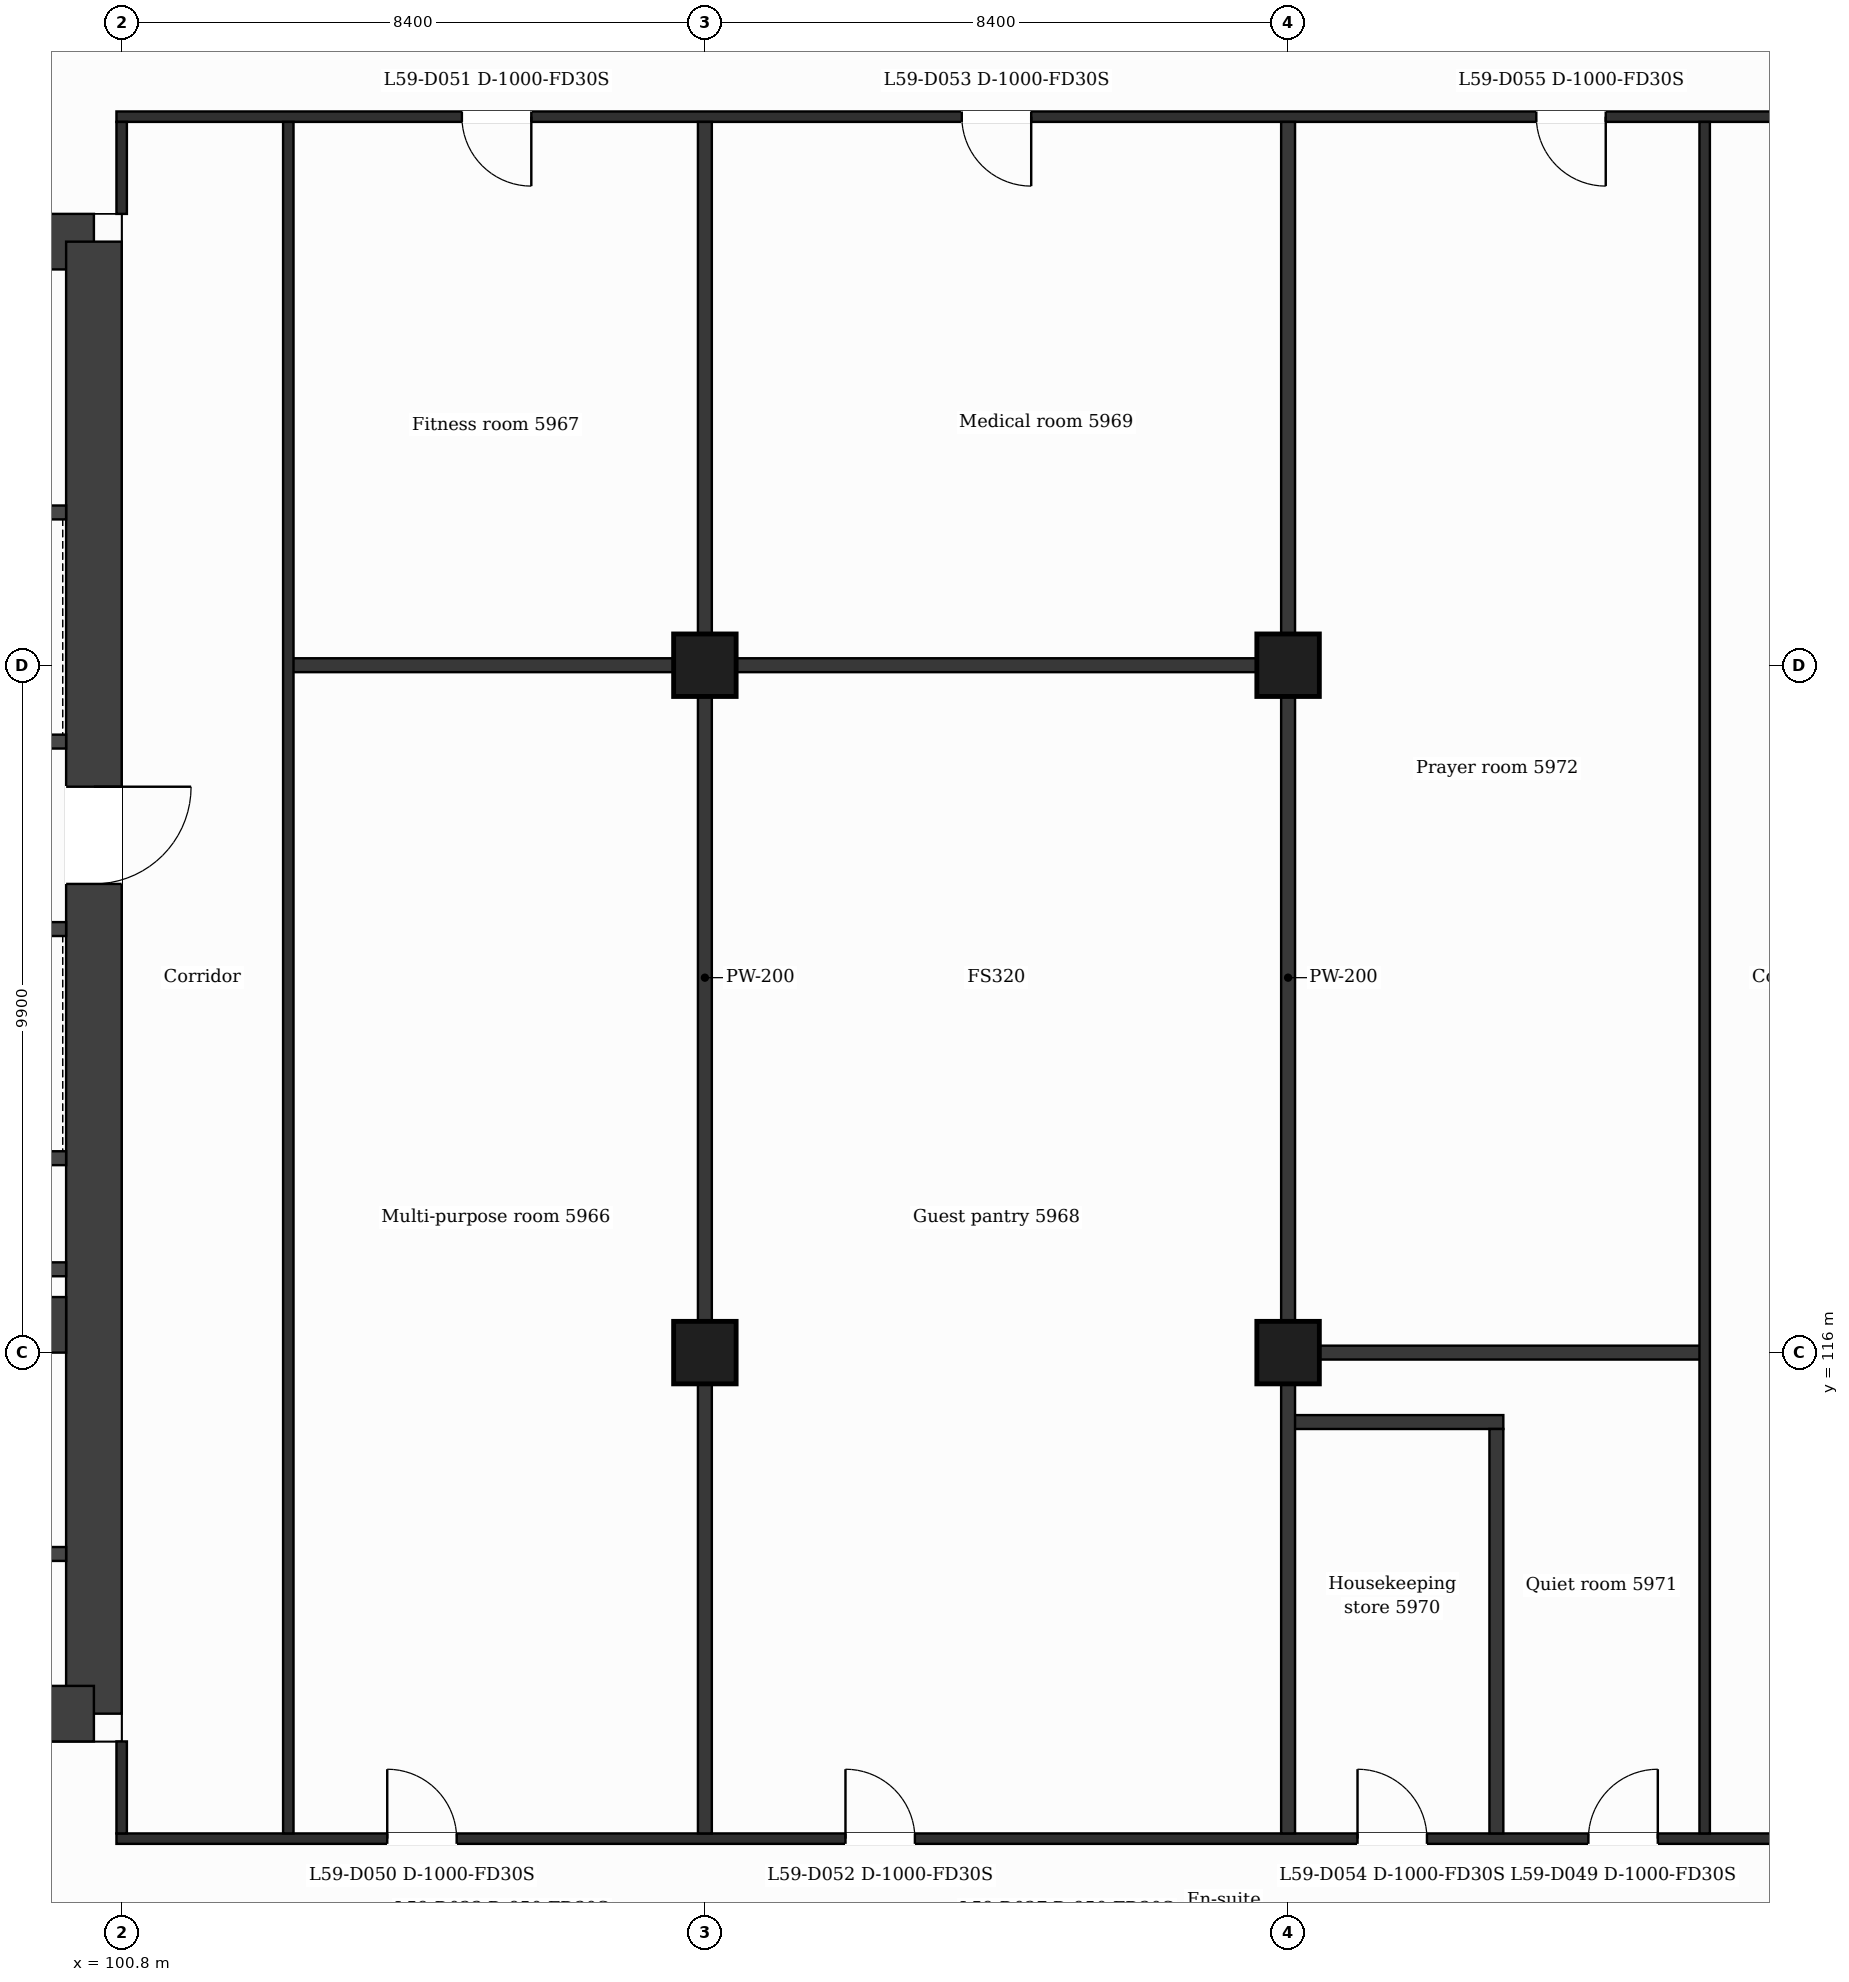
"""IFC4 building model, lengths in metres.
Left out: names, types, materials, properties, quantities, classifications, styles, units other than length and angle.
Written with IfcOpenShell. Run it as: python <this file> out.ifc"""

import sys

from ifc_helpers import new_model, si_unit, direction, frame, frame_2d, origin, origin_2d, place, context, subcontext, project, spatial, rectangle, extrude, element, fill, save


model = new_model("IFC4")
c1 = context("Model", 3, precision=1e-05, world=origin(), true_north=direction((0.0, 1.0)))
c2 = subcontext(c1, "Body", "Model", "MODEL_VIEW")
j1 = project(units=[si_unit("LENGTHUNIT", "METRE"), si_unit("PLANEANGLEUNIT", "RADIAN")], contexts=[c1])
p1 = place(None, origin())
s1 = spatial("IfcSite", under=j1, at=p1, CompositionType="ELEMENT")
p2 = place(p1, origin())
s2 = spatial("IfcBuilding", under=s1, at=p2, CompositionType="ELEMENT")
p3 = place(p2, frame((0.0, 0.0, 242.9)))
s3 = spatial("IfcBuildingStorey", under=s2, at=p3, CompositionType="ELEMENT", Elevation=242.9)
p4 = place(p3, frame((88.98, 132.0, 0.0), z_axis=(0.0, 0.0, 1.0), x_axis=(1.0, 0.0, 0.0)))
e1 = element("IfcWall", 1, at=p4, inside=s3, PredefinedType="SHEAR", context=c2, shape_type="SweptSolid", body=[
    extrude(rectangle(XDim=11.419, YDim=0.8, at=frame_2d((5.71, 0.0))), origin(), (0.0, 0.0, 1.0), 3.7),
])
p5 = place(p4, frame((6.833, 0.0, 0.0)))
e2 = element("IfcOpeningElement", 2, at=p5, cuts=e1, PredefinedType="OPENING", context=c2, shape_type="SweptSolid", body=[
    extrude(rectangle(XDim=1.2, YDim=2.1, at=frame_2d((0.6, 1.05))), frame((0.0, 0.41, 0.0), z_axis=(0.0, -1.0, 0.0), x_axis=(1.0, 0.0, 0.0)), (0.0, 0.0, 1.0), 0.82),
])
p6 = place(p3, frame((100.4, 132.0, 0.0), z_axis=(0.0, 0.0, 1.0), x_axis=(0.0, -1.0, 0.0)))
e3 = element("IfcWall", 3, at=p6, inside=s3, PredefinedType="SHEAR", context=c2, shape_type="SweptSolid", body=[
    extrude(rectangle(XDim=21.2, YDim=0.8, at=frame_2d((10.6, 0.0))), origin(), (0.0, 0.0, 1.0), 3.7),
])
p7 = place(p6, frame((7.85, 0.0, 0.0)))
e4 = element("IfcOpeningElement", 4, at=p7, cuts=e3, PredefinedType="OPENING", context=c2, shape_type="SweptSolid", body=[
    extrude(rectangle(XDim=1.4, YDim=2.1, at=frame_2d((0.7, 1.05))), frame((0.0, 0.41, 0.0), z_axis=(0.0, -1.0, 0.0), x_axis=(1.0, 0.0, 0.0)), (0.0, 0.0, 1.0), 0.82),
])
p8 = place(p3, frame((100.4, 110.8, 0.0), z_axis=(0.0, 0.0, 1.0), x_axis=(-1.0, 0.0, 0.0)))
e5 = element("IfcWall", 5, at=p8, inside=s3, PredefinedType="SHEAR", context=c2, shape_type="SweptSolid", body=[
    extrude(rectangle(XDim=14.273, YDim=0.8, at=frame_2d((7.137, 0.0))), origin(), (0.0, 0.0, 1.0), 3.7),
])
p9 = place(p8, frame((5.908, 0.0, 0.0)))
e6 = element("IfcOpeningElement", 6, at=p9, cuts=e5, PredefinedType="OPENING", context=c2, shape_type="SweptSolid", body=[
    extrude(rectangle(XDim=1.4, YDim=2.1, at=frame_2d((0.7, 1.05))), frame((0.0, 0.41, 0.0), z_axis=(0.0, -1.0, 0.0), x_axis=(1.0, 0.0, 0.0)), (0.0, 0.0, 1.0), 0.82),
])
p10 = place(p3, frame((94.7, 116.4, 0.0), z_axis=(0.0, 0.0, 1.0), x_axis=(1.0, 0.0, 0.0)))
e7 = element("IfcWall", 7, at=p10, inside=s3, PredefinedType="SHEAR", context=c2, shape_type="SweptSolid", body=[
    extrude(rectangle(XDim=5.3, YDim=0.8, at=frame_2d((2.65, 0.0))), origin(), (0.0, 0.0, 1.0), 3.7),
])
for number, where, z_axis, x_axis in (
    (8, (109.2, 116.0, 0.0), (0.0, 0.0, 1.0), (1.0, 0.0, 0.0)),
    (9, (117.6, 116.0, 0.0), (0.0, 0.0, 1.0), (1.0, 0.0, 0.0)),
    (10, (109.2, 125.9, 0.0), (0.0, 0.0, 1.0), (1.0, 0.0, 0.0)),
    (11, (117.6, 125.9, 0.0), (0.0, 0.0, 1.0), (1.0, 0.0, 0.0)),
):
    element("IfcColumn", number, at=place(p3, frame(where, z_axis=z_axis, x_axis=x_axis)), inside=s3, PredefinedType="COLUMN", context=c2, shape_type="SweptSolid", body=[
        extrude(rectangle(XDim=0.9, YDim=0.9, at=origin_2d()), origin(), (0.0, 0.0, 1.0), 3.7),
    ])
p11 = place(p3, frame((100.725, 109.0, 0.0), z_axis=(0.0, 0.0, 1.0), x_axis=(1.0, 0.0, 0.0)))
e12 = element("IfcWall", 12, at=p11, inside=s3, PredefinedType="PARTITIONING", context=c2, shape_type="SweptSolid", body=[
    extrude(rectangle(XDim=25.35, YDim=0.15, at=frame_2d((12.675, 0.0))), origin(), (0.0, 0.0, 1.0), 3.2),
])
p12 = place(p11, frame((21.2, 0.0, 0.0)))
e13 = element("IfcOpeningElement", 13, at=p12, cuts=e12, PredefinedType="OPENING", context=c2, shape_type="SweptSolid", body=[
    extrude(rectangle(XDim=1.0, YDim=2.1, at=frame_2d((0.5, 1.05))), frame((0.0, 0.085, 0.0), z_axis=(0.0, -1.0, 0.0), x_axis=(1.0, 0.0, 0.0)), (0.0, 0.0, 1.0), 0.17),
])
p13 = place(p11, frame((3.9, 0.0, 0.0)))
e14 = element("IfcOpeningElement", 14, at=p13, cuts=e12, PredefinedType="OPENING", context=c2, shape_type="SweptSolid", body=[
    extrude(rectangle(XDim=1.0, YDim=2.1, at=frame_2d((0.5, 1.05))), frame((0.0, 0.085, 0.0), z_axis=(0.0, -1.0, 0.0), x_axis=(1.0, 0.0, 0.0)), (0.0, 0.0, 1.0), 0.17),
])
p14 = place(p11, frame((10.5, 0.0, 0.0)))
e15 = element("IfcOpeningElement", 15, at=p14, cuts=e12, PredefinedType="OPENING", context=c2, shape_type="SweptSolid", body=[
    extrude(rectangle(XDim=1.0, YDim=2.1, at=frame_2d((0.5, 1.05))), frame((0.0, 0.085, 0.0), z_axis=(0.0, -1.0, 0.0), x_axis=(1.0, 0.0, 0.0)), (0.0, 0.0, 1.0), 0.17),
])
p15 = place(p11, frame((17.875, 0.0, 0.0)))
e16 = element("IfcOpeningElement", 16, at=p15, cuts=e12, PredefinedType="OPENING", context=c2, shape_type="SweptSolid", body=[
    extrude(rectangle(XDim=1.0, YDim=2.1, at=frame_2d((0.5, 1.05))), frame((0.0, 0.085, 0.0), z_axis=(0.0, -1.0, 0.0), x_axis=(1.0, 0.0, 0.0)), (0.0, 0.0, 1.0), 0.17),
])
p16 = place(p3, frame((95.127, 113.1, 0.0), z_axis=(0.0, 0.0, 1.0), x_axis=(1.0, 0.0, 0.0)))
e17 = element("IfcWall", 17, at=p16, inside=s3, PredefinedType="PARTITIONING", context=c2, shape_type="SweptSolid", body=[
    extrude(rectangle(XDim=4.873, YDim=0.2, at=frame_2d((2.437, 0.0))), origin(), (0.0, 0.0, 1.0), 3.2),
])
p17 = place(p16, frame((3.426, 0.0, 0.0)))
e18 = element("IfcOpeningElement", 18, at=p17, cuts=e17, PredefinedType="OPENING", context=c2, shape_type="SweptSolid", body=[
    extrude(rectangle(XDim=0.9, YDim=2.1, at=frame_2d((0.45, 1.05))), frame((0.0, 0.11, 0.0), z_axis=(0.0, -1.0, 0.0), x_axis=(1.0, 0.0, 0.0)), (0.0, 0.0, 1.0), 0.22),
])
p18 = place(p3, frame((117.6, 115.0, 0.0), z_axis=(0.0, 0.0, 1.0), x_axis=(1.0, 0.0, 0.0)))
e19 = element("IfcWall", 19, at=p18, inside=s3, PredefinedType="PARTITIONING", context=c2, shape_type="SweptSolid", body=[
    extrude(rectangle(XDim=3.1, YDim=0.2, at=frame_2d((1.55, 0.0))), origin(), (0.0, 0.0, 1.0), 3.2),
])
p19 = place(p3, frame((117.6, 116.0, 0.0), z_axis=(0.0, 0.0, 1.0), x_axis=(1.0, 0.0, 0.0)))
e20 = element("IfcWall", 20, at=p19, inside=s3, PredefinedType="PARTITIONING", context=c2, shape_type="SweptSolid", body=[
    extrude(rectangle(XDim=6.0, YDim=0.2, at=frame_2d((3.0, 0.0))), origin(), (0.0, 0.0, 1.0), 3.2),
])
for number, where, z_axis, x_axis in (
    (21, (95.227, 117.2, 0.0), (0.0, 0.0, 1.0), (1.0, 0.0, 0.0)),
    (22, (95.227, 118.8, 0.0), (0.0, 0.0, 1.0), (1.0, 0.0, 0.0)),
):
    element("IfcWall", number, at=place(p3, frame(where, z_axis=z_axis, x_axis=x_axis)), inside=s3, PredefinedType="PARTITIONING", context=c2, shape_type="SweptSolid", body=[
        extrude(rectangle(XDim=4.773, YDim=0.2, at=frame_2d((2.386, 0.0))), origin(), (0.0, 0.0, 1.0), 3.2),
    ])
p20 = place(p3, frame((95.227, 122.1, 0.0), z_axis=(0.0, 0.0, 1.0), x_axis=(1.0, 0.0, 0.0)))
e23 = element("IfcWall", 23, at=p20, inside=s3, PredefinedType="PARTITIONING", context=c2, shape_type="SweptSolid", body=[
    extrude(rectangle(XDim=4.773, YDim=0.2, at=frame_2d((2.386, 0.0))), origin(), (0.0, 0.0, 1.0), 3.2),
])
p21 = place(p20, frame((0.702, 0.0, 0.0)))
e24 = element("IfcOpeningElement", 24, at=p21, cuts=e23, PredefinedType="OPENING", context=c2, shape_type="SweptSolid", body=[
    extrude(rectangle(XDim=1.1, YDim=2.1, at=frame_2d((0.55, 1.05))), frame((0.0, 0.11, 0.0), z_axis=(0.0, -1.0, 0.0), x_axis=(1.0, 0.0, 0.0)), (0.0, 0.0, 1.0), 0.22),
])
p22 = place(p20, frame((2.971, 0.0, 0.0)))
e25 = element("IfcOpeningElement", 25, at=p22, cuts=e23, PredefinedType="OPENING", context=c2, shape_type="SweptSolid", body=[
    extrude(rectangle(XDim=1.1, YDim=2.1, at=frame_2d((0.55, 1.05))), frame((0.0, 0.11, 0.0), z_axis=(0.0, -1.0, 0.0), x_axis=(1.0, 0.0, 0.0)), (0.0, 0.0, 1.0), 0.22),
])
p23 = place(p3, frame((92.702, 124.8, 0.0), z_axis=(0.0, 0.0, 1.0), x_axis=(1.0, 0.0, 0.0)))
e26 = element("IfcWall", 26, at=p23, inside=s3, PredefinedType="PARTITIONING", context=c2, shape_type="SweptSolid", body=[
    extrude(rectangle(XDim=7.298, YDim=0.2, at=frame_2d((3.649, 0.0))), origin(), (0.0, 0.0, 1.0), 3.2),
])
p24 = place(p23, frame((5.7, 0.0, 0.0)))
e27 = element("IfcOpeningElement", 27, at=p24, cuts=e26, PredefinedType="OPENING", context=c2, shape_type="SweptSolid", body=[
    extrude(rectangle(XDim=1.1, YDim=2.1, at=frame_2d((0.55, 1.05))), frame((0.0, 0.11, 0.0), z_axis=(0.0, -1.0, 0.0), x_axis=(1.0, 0.0, 0.0)), (0.0, 0.0, 1.0), 0.22),
])
p25 = place(p3, frame((103.2, 125.9, 0.0), z_axis=(0.0, 0.0, 1.0), x_axis=(1.0, 0.0, 0.0)))
e28 = element("IfcWall", 28, at=p25, inside=s3, PredefinedType="PARTITIONING", context=c2, shape_type="SweptSolid", body=[
    extrude(rectangle(XDim=14.4, YDim=0.2, at=frame_2d((7.2, 0.0))), origin(), (0.0, 0.0, 1.0), 3.2),
])
p26 = place(p3, frame((92.827, 128.1, 0.0), z_axis=(0.0, 0.0, 1.0), x_axis=(1.0, 0.0, 0.0)))
e29 = element("IfcWall", 29, at=p26, inside=s3, PredefinedType="PARTITIONING", context=c2, shape_type="SweptSolid", body=[
    extrude(rectangle(XDim=7.173, YDim=0.2, at=frame_2d((3.586, 0.0))), origin(), (0.0, 0.0, 1.0), 3.2),
])
p27 = place(p26, frame((2.977, 0.0, 0.0)))
e30 = element("IfcOpeningElement", 30, at=p27, cuts=e29, PredefinedType="OPENING", context=c2, shape_type="SweptSolid", body=[
    extrude(rectangle(XDim=1.1, YDim=2.1, at=frame_2d((0.55, 1.05))), frame((0.0, 0.11, 0.0), z_axis=(0.0, -1.0, 0.0), x_axis=(1.0, 0.0, 0.0)), (0.0, 0.0, 1.0), 0.22),
])
p28 = place(p3, frame((100.725, 133.8, 0.0), z_axis=(0.0, 0.0, 1.0), x_axis=(1.0, 0.0, 0.0)))
e31 = element("IfcWall", 31, at=p28, inside=s3, PredefinedType="PARTITIONING", context=c2, shape_type="SweptSolid", body=[
    extrude(rectangle(XDim=25.35, YDim=0.15, at=frame_2d((12.675, 0.0))), origin(), (0.0, 0.0, 1.0), 3.2),
])
p29 = place(p28, frame((4.975, 0.0, 0.0)))
e32 = element("IfcOpeningElement", 32, at=p29, cuts=e31, PredefinedType="OPENING", context=c2, shape_type="SweptSolid", body=[
    extrude(rectangle(XDim=1.0, YDim=2.1, at=frame_2d((0.5, 1.05))), frame((0.0, 0.085, 0.0), z_axis=(0.0, -1.0, 0.0), x_axis=(1.0, 0.0, 0.0)), (0.0, 0.0, 1.0), 0.17),
])
p30 = place(p28, frame((12.175, 0.0, 0.0)))
e33 = element("IfcOpeningElement", 33, at=p30, cuts=e31, PredefinedType="OPENING", context=c2, shape_type="SweptSolid", body=[
    extrude(rectangle(XDim=1.0, YDim=2.1, at=frame_2d((0.5, 1.05))), frame((0.0, 0.085, 0.0), z_axis=(0.0, -1.0, 0.0), x_axis=(1.0, 0.0, 0.0)), (0.0, 0.0, 1.0), 0.17),
])
p31 = place(p28, frame((20.45, 0.0, 0.0)))
e34 = element("IfcOpeningElement", 34, at=p31, cuts=e31, PredefinedType="OPENING", context=c2, shape_type="SweptSolid", body=[
    extrude(rectangle(XDim=1.0, YDim=2.1, at=frame_2d((0.5, 1.05))), frame((0.0, 0.085, 0.0), z_axis=(0.0, -1.0, 0.0), x_axis=(1.0, 0.0, 0.0)), (0.0, 0.0, 1.0), 0.17),
])
p32 = place(p3, frame((100.8, 109.075, 0.0), z_axis=(0.0, 0.0, 1.0), x_axis=(0.0, 1.0, 0.0)))
e35 = element("IfcWall", 35, at=p32, inside=s3, PredefinedType="PARTITIONING", context=c2, shape_type="SweptSolid", body=[
    extrude(rectangle(XDim=1.325, YDim=0.15, at=frame_2d((0.663, 0.0))), origin(), (0.0, 0.0, 1.0), 3.2),
])
p33 = place(p3, frame((100.8, 132.4, 0.0), z_axis=(0.0, 0.0, 1.0), x_axis=(0.0, 1.0, 0.0)))
e36 = element("IfcWall", 36, at=p33, inside=s3, PredefinedType="PARTITIONING", context=c2, shape_type="SweptSolid", body=[
    extrude(rectangle(XDim=1.325, YDim=0.15, at=frame_2d((0.663, 0.0))), origin(), (0.0, 0.0, 1.0), 3.2),
])
p34 = place(p3, frame((103.2, 109.075, 0.0), z_axis=(0.0, 0.0, 1.0), x_axis=(0.0, 1.0, 0.0)))
e37 = element("IfcWall", 37, at=p34, inside=s3, PredefinedType="PARTITIONING", context=c2, shape_type="SweptSolid", body=[
    extrude(rectangle(XDim=24.65, YDim=0.15, at=frame_2d((12.325, 0.0))), origin(), (0.0, 0.0, 1.0), 3.2),
])
for number, where, z_axis, x_axis in (
    (38, (109.2, 109.075, 0.0), (0.0, 0.0, 1.0), (0.0, 1.0, 0.0)),
    (39, (117.6, 109.075, 0.0), (0.0, 0.0, 1.0), (0.0, 1.0, 0.0)),
):
    element("IfcWall", number, at=place(p3, frame(where, z_axis=z_axis, x_axis=x_axis)), inside=s3, PredefinedType="PARTITIONING", context=c2, shape_type="SweptSolid", body=[
        extrude(rectangle(XDim=24.65, YDim=0.2, at=frame_2d((12.325, 0.0))), origin(), (0.0, 0.0, 1.0), 3.2),
    ])
p35 = place(p3, frame((120.6, 109.075, 0.0), z_axis=(0.0, 0.0, 1.0), x_axis=(0.0, 1.0, 0.0)))
e40 = element("IfcWall", 40, at=p35, inside=s3, PredefinedType="PARTITIONING", context=c2, shape_type="SweptSolid", body=[
    extrude(rectangle(XDim=5.825, YDim=0.2, at=frame_2d((2.913, 0.0))), origin(), (0.0, 0.0, 1.0), 3.2),
])
p36 = place(p3, frame((123.6, 109.075, 0.0), z_axis=(0.0, 0.0, 1.0), x_axis=(0.0, 1.0, 0.0)))
e41 = element("IfcWall", 41, at=p36, inside=s3, PredefinedType="PARTITIONING", context=c2, shape_type="SweptSolid", body=[
    extrude(rectangle(XDim=24.65, YDim=0.15, at=frame_2d((12.325, 0.0))), origin(), (0.0, 0.0, 1.0), 3.2),
])
p37 = place(p12, origin())
e42 = element("IfcDoor", 42, at=p37, inside=s3, OperationType="SINGLE_SWING_RIGHT", PredefinedType="DOOR", context=c2, shape_type="SweptSolid", body=[
    extrude(rectangle(XDim=1.0, YDim=2.1, at=frame_2d((0.5, 1.05))), frame((0.0, 0.025, 0.0), z_axis=(0.0, -1.0, 0.0), x_axis=(1.0, 0.0, 0.0)), (0.0, 0.0, 1.0), 0.05),
])
fill(e13, e42)
p38 = place(p13, origin())
e43 = element("IfcDoor", 43, at=p38, inside=s3, OperationType="SINGLE_SWING_LEFT", PredefinedType="DOOR", context=c2, shape_type="SweptSolid", body=[
    extrude(rectangle(XDim=1.0, YDim=2.1, at=frame_2d((0.5, 1.05))), frame((0.0, 0.025, 0.0), z_axis=(0.0, -1.0, 0.0), x_axis=(1.0, 0.0, 0.0)), (0.0, 0.0, 1.0), 0.05),
])
fill(e14, e43)
p39 = place(p29, origin())
e44 = element("IfcDoor", 44, at=p39, inside=s3, OperationType="SINGLE_SWING_RIGHT", PredefinedType="DOOR", context=c2, shape_type="SweptSolid", body=[
    extrude(rectangle(XDim=1.0, YDim=2.1, at=frame_2d((0.5, 1.05))), frame((0.0, 0.025, 0.0), z_axis=(0.0, -1.0, 0.0), x_axis=(1.0, 0.0, 0.0)), (0.0, 0.0, 1.0), 0.05),
])
fill(e32, e44)
p40 = place(p14, origin())
e45 = element("IfcDoor", 45, at=p40, inside=s3, OperationType="SINGLE_SWING_LEFT", PredefinedType="DOOR", context=c2, shape_type="SweptSolid", body=[
    extrude(rectangle(XDim=1.0, YDim=2.1, at=frame_2d((0.5, 1.05))), frame((0.0, 0.025, 0.0), z_axis=(0.0, -1.0, 0.0), x_axis=(1.0, 0.0, 0.0)), (0.0, 0.0, 1.0), 0.05),
])
fill(e15, e45)
p41 = place(p30, origin())
e46 = element("IfcDoor", 46, at=p41, inside=s3, OperationType="SINGLE_SWING_RIGHT", PredefinedType="DOOR", context=c2, shape_type="SweptSolid", body=[
    extrude(rectangle(XDim=1.0, YDim=2.1, at=frame_2d((0.5, 1.05))), frame((0.0, 0.025, 0.0), z_axis=(0.0, -1.0, 0.0), x_axis=(1.0, 0.0, 0.0)), (0.0, 0.0, 1.0), 0.05),
])
fill(e33, e46)
p42 = place(p15, origin())
e47 = element("IfcDoor", 47, at=p42, inside=s3, OperationType="SINGLE_SWING_LEFT", PredefinedType="DOOR", context=c2, shape_type="SweptSolid", body=[
    extrude(rectangle(XDim=1.0, YDim=2.1, at=frame_2d((0.5, 1.05))), frame((0.0, 0.025, 0.0), z_axis=(0.0, -1.0, 0.0), x_axis=(1.0, 0.0, 0.0)), (0.0, 0.0, 1.0), 0.05),
])
fill(e16, e47)
p43 = place(p31, origin())
e48 = element("IfcDoor", 48, at=p43, inside=s3, OperationType="SINGLE_SWING_RIGHT", PredefinedType="DOOR", context=c2, shape_type="SweptSolid", body=[
    extrude(rectangle(XDim=1.0, YDim=2.1, at=frame_2d((0.5, 1.05))), frame((0.0, 0.025, 0.0), z_axis=(0.0, -1.0, 0.0), x_axis=(1.0, 0.0, 0.0)), (0.0, 0.0, 1.0), 0.05),
])
fill(e34, e48)
p44 = place(p7, origin())
e49 = element("IfcDoor", 49, at=p44, inside=s3, OperationType="SINGLE_SWING_LEFT", PredefinedType="DOOR", context=c2, shape_type="SweptSolid", body=[
    extrude(rectangle(XDim=1.4, YDim=2.1, at=frame_2d((0.7, 1.05))), frame((0.0, 0.025, 0.0), z_axis=(0.0, -1.0, 0.0), x_axis=(1.0, 0.0, 0.0)), (0.0, 0.0, 1.0), 0.05),
])
fill(e4, e49)
save(model, sys.argv[1])
